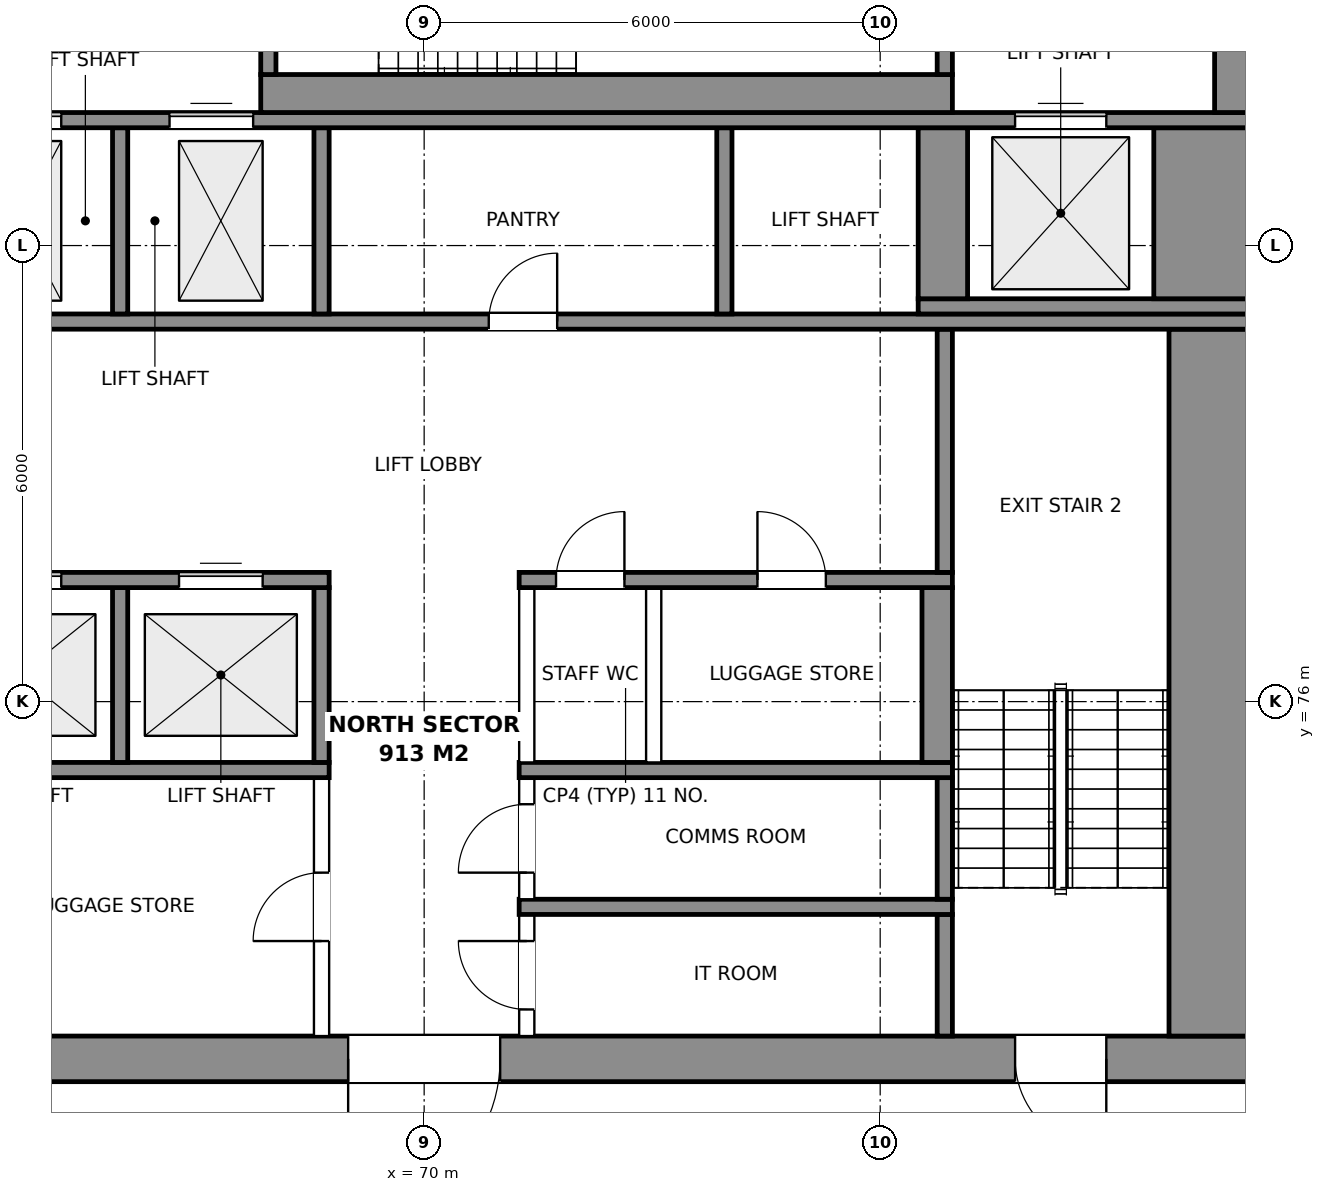
"""IFC4 building model, lengths in metres.
Left out: names, types, materials, properties, quantities, classifications, styles, units other than length and angle.
Written with IfcOpenShell. Run it as: python <this file> out.ifc"""

import sys

from ifc_helpers import new_model, si_unit, direction, frame, frame_2d, origin, place, context, subcontext, project, spatial, rectangle, extrude, element, fill, save


model = new_model("IFC4")
c1 = context("Model", 3, precision=1e-05, world=origin(), true_north=direction((0.0, 1.0)))
c2 = subcontext(c1, "Body", "Model", "MODEL_VIEW")
j1 = project(units=[si_unit("LENGTHUNIT", "METRE"), si_unit("PLANEANGLEUNIT", "RADIAN")], contexts=[c1])
p1 = place(None, origin())
s1 = spatial("IfcSite", under=j1, at=p1, CompositionType="ELEMENT")
p2 = place(p1, origin())
s2 = spatial("IfcBuilding", under=s1, at=p2, CompositionType="ELEMENT")
p3 = place(p2, frame((0.0, 0.0, 313.9)))
s3 = spatial("IfcBuildingStorey", under=s2, at=p3, CompositionType="ELEMENT", Elevation=313.9)
p4 = place(p3, frame((59.0, 71.3, 0.0), z_axis=(0.0, 0.0, 1.0), x_axis=(1.0, 0.0, 0.0)))
e1 = element("IfcWall", 1, at=p4, inside=s3, PredefinedType="SHEAR", context=c2, shape_type="SweptSolid", body=[
    extrude(rectangle(XDim=22.0, YDim=0.6, at=frame_2d((11.0, 0.0))), origin(), (0.0, 0.0, 1.0), 3.9),
])
p5 = place(p4, frame((2.025, 0.0, 0.0)))
e2 = element("IfcOpeningElement", 2, at=p5, cuts=e1, PredefinedType="OPENING", context=c2, shape_type="SweptSolid", body=[
    extrude(rectangle(XDim=1.2, YDim=2.1, at=frame_2d((0.6, 1.05))), frame((0.0, 0.31, 0.0), z_axis=(0.0, -1.0, 0.0), x_axis=(1.0, 0.0, 0.0)), (0.0, 0.0, 1.0), 0.62),
])
p6 = place(p4, frame((18.775, 0.0, 0.0)))
e3 = element("IfcOpeningElement", 3, at=p6, cuts=e1, PredefinedType="OPENING", context=c2, shape_type="SweptSolid", body=[
    extrude(rectangle(XDim=1.2, YDim=2.1, at=frame_2d((0.6, 1.05))), frame((0.0, 0.31, 0.0), z_axis=(0.0, -1.0, 0.0), x_axis=(1.0, 0.0, 0.0)), (0.0, 0.0, 1.0), 0.62),
])
p7 = place(p4, frame((10.0, 0.0, 0.0)))
e4 = element("IfcOpeningElement", 4, at=p7, cuts=e1, PredefinedType="OPENING", context=c2, shape_type="SweptSolid", body=[
    extrude(rectangle(XDim=2.0, YDim=2.1, at=frame_2d((1.0, 1.05))), frame((0.0, 0.31, 0.0), z_axis=(0.0, -1.0, 0.0), x_axis=(1.0, 0.0, 0.0)), (0.0, 0.0, 1.0), 0.62),
])
p8 = place(p3, frame((68.65, 71.6, 0.0), z_axis=(0.0, 0.0, 1.0), x_axis=(0.0, 1.0, 0.0)))
e5 = element("IfcWall", 5, at=p8, inside=s3, PredefinedType="PARTITIONING", context=c2, shape_type="SweptSolid", body=[
    extrude(rectangle(XDim=3.4, YDim=0.2, at=frame_2d((1.7, 0.0))), origin(), (0.0, 0.0, 1.0), 3.6),
])
p9 = place(p8, frame((1.25, 0.0, 0.0)))
e6 = element("IfcOpeningElement", 6, at=p9, cuts=e5, PredefinedType="OPENING", context=c2, shape_type="SweptSolid", body=[
    extrude(rectangle(XDim=0.9, YDim=2.1, at=frame_2d((0.45, 1.05))), frame((0.0, 0.11, 0.0), z_axis=(0.0, -1.0, 0.0), x_axis=(1.0, 0.0, 0.0)), (0.0, 0.0, 1.0), 0.22),
])
p10 = place(p3, frame((71.35, 71.6, 0.0), z_axis=(0.0, 0.0, 1.0), x_axis=(0.0, 1.0, 0.0)))
e7 = element("IfcWall", 7, at=p10, inside=s3, PredefinedType="PARTITIONING", context=c2, shape_type="SweptSolid", body=[
    extrude(rectangle(XDim=1.6, YDim=0.2, at=frame_2d((0.8, 0.0))), origin(), (0.0, 0.0, 1.0), 3.6),
])
p11 = place(p10, frame((0.35, 0.0, 0.0)))
e8 = element("IfcOpeningElement", 8, at=p11, cuts=e7, PredefinedType="OPENING", context=c2, shape_type="SweptSolid", body=[
    extrude(rectangle(XDim=0.9, YDim=2.1, at=frame_2d((0.45, 1.05))), frame((0.0, 0.11, 0.0), z_axis=(0.0, -1.0, 0.0), x_axis=(1.0, 0.0, 0.0)), (0.0, 0.0, 1.0), 0.22),
])
p12 = place(p3, frame((76.85, 71.6, 0.0), z_axis=(0.0, 0.0, 1.0), x_axis=(0.0, 1.0, 0.0)))
e9 = element("IfcWall", 9, at=p12, inside=s3, PredefinedType="SHEAR", context=c2, shape_type="SweptSolid", body=[
    extrude(rectangle(XDim=1.6, YDim=0.2, at=frame_2d((0.8, 0.0))), origin(), (0.0, 0.0, 1.0), 3.9),
])
p13 = place(p3, frame((80.4, 71.6, 0.0), z_axis=(0.0, 0.0, 1.0), x_axis=(0.0, 1.0, 0.0)))
e10 = element("IfcWall", 10, at=p13, inside=s3, PredefinedType="SHEAR", context=c2, shape_type="SweptSolid", body=[
    extrude(rectangle(XDim=9.3, YDim=1.2, at=frame_2d((4.65, 0.0))), origin(), (0.0, 0.0, 1.0), 3.9),
])
p14 = place(p3, frame((71.25, 73.3, 0.0), z_axis=(0.0, 0.0, 1.0), x_axis=(1.0, 0.0, 0.0)))
e11 = element("IfcWall", 11, at=p14, inside=s3, PredefinedType="SHEAR", context=c2, shape_type="SweptSolid", body=[
    extrude(rectangle(XDim=5.7, YDim=0.2, at=frame_2d((2.85, 0.0))), origin(), (0.0, 0.0, 1.0), 3.9),
])
p15 = place(p3, frame((71.35, 73.4, 0.0), z_axis=(0.0, 0.0, 1.0), x_axis=(0.0, 1.0, 0.0)))
e12 = element("IfcWall", 12, at=p15, inside=s3, PredefinedType="PARTITIONING", context=c2, shape_type="SweptSolid", body=[
    extrude(rectangle(XDim=1.6, YDim=0.2, at=frame_2d((0.8, 0.0))), origin(), (0.0, 0.0, 1.0), 3.6),
])
p16 = place(p15, frame((0.35, 0.0, 0.0)))
e13 = element("IfcOpeningElement", 13, at=p16, cuts=e12, PredefinedType="OPENING", context=c2, shape_type="SweptSolid", body=[
    extrude(rectangle(XDim=0.9, YDim=2.1, at=frame_2d((0.45, 1.05))), frame((0.0, 0.11, 0.0), z_axis=(0.0, -1.0, 0.0), x_axis=(1.0, 0.0, 0.0)), (0.0, 0.0, 1.0), 0.22),
])
p17 = place(p3, frame((76.85, 73.4, 0.0), z_axis=(0.0, 0.0, 1.0), x_axis=(0.0, 1.0, 0.0)))
e14 = element("IfcWall", 14, at=p17, inside=s3, PredefinedType="SHEAR", context=c2, shape_type="SweptSolid", body=[
    extrude(rectangle(XDim=1.6, YDim=0.2, at=frame_2d((0.8, 0.0))), origin(), (0.0, 0.0, 1.0), 3.9),
])
for number, where, z_axis, x_axis in (
    (15, (63.05, 75.1, 0.0), (0.0, 0.0, 1.0), (1.0, 0.0, 0.0)),
    (16, (71.25, 75.1, 0.0), (0.0, 0.0, 1.0), (1.0, 0.0, 0.0)),
):
    element("IfcWall", number, at=place(p3, frame(where, z_axis=z_axis, x_axis=x_axis)), inside=s3, PredefinedType="SHEAR", context=c2, shape_type="SweptSolid", body=[
        extrude(rectangle(XDim=5.7, YDim=0.2, at=frame_2d((2.85, 0.0))), origin(), (0.0, 0.0, 1.0), 3.9),
    ])
for number, where, z_axis, x_axis in (
    (17, (66.0, 75.2, 0.0), (0.0, 0.0, 1.0), (0.0, 1.0, 0.0)),
    (18, (68.65, 75.2, 0.0), (0.0, 0.0, 1.0), (0.0, 1.0, 0.0)),
):
    element("IfcWall", number, at=place(p3, frame(where, z_axis=z_axis, x_axis=x_axis)), inside=s3, PredefinedType="SHEAR", context=c2, shape_type="SweptSolid", body=[
        extrude(rectangle(XDim=2.3, YDim=0.2, at=frame_2d((1.15, 0.0))), origin(), (0.0, 0.0, 1.0), 3.9),
    ])
for number, where, z_axis, x_axis in (
    (19, (71.35, 75.2, 0.0), (0.0, 0.0, 1.0), (0.0, 1.0, 0.0)),
    (20, (73.02, 75.2, 0.0), (0.0, 0.0, 1.0), (0.0, 1.0, 0.0)),
):
    element("IfcWall", number, at=place(p3, frame(where, z_axis=z_axis, x_axis=x_axis)), inside=s3, PredefinedType="PARTITIONING", context=c2, shape_type="SweptSolid", body=[
        extrude(rectangle(XDim=2.3, YDim=0.2, at=frame_2d((1.15, 0.0))), origin(), (0.0, 0.0, 1.0), 3.6),
    ])
p18 = place(p3, frame((76.75, 75.2, 0.0), z_axis=(0.0, 0.0, 1.0), x_axis=(0.0, 1.0, 0.0)))
e21 = element("IfcWall", 21, at=p18, inside=s3, PredefinedType="SHEAR", context=c2, shape_type="SweptSolid", body=[
    extrude(rectangle(XDim=2.3, YDim=0.4, at=frame_2d((1.15, 0.0))), origin(), (0.0, 0.0, 1.0), 3.9),
])
p19 = place(p3, frame((63.05, 77.6, 0.0), z_axis=(0.0, 0.0, 1.0), x_axis=(1.0, 0.0, 0.0)))
e22 = element("IfcWall", 22, at=p19, inside=s3, PredefinedType="SHEAR", context=c2, shape_type="SweptSolid", body=[
    extrude(rectangle(XDim=5.7, YDim=0.2, at=frame_2d((2.85, 0.0))), origin(), (0.0, 0.0, 1.0), 3.9),
])
p20 = place(p19, frame((1.075, 0.0, 0.0)))
e23 = element("IfcOpeningElement", 23, at=p20, cuts=e22, PredefinedType="OPENING", context=c2, shape_type="SweptSolid", body=[
    extrude(rectangle(XDim=1.1, YDim=2.1, at=frame_2d((0.55, 1.05))), frame((0.0, 0.11, 0.0), z_axis=(0.0, -1.0, 0.0), x_axis=(1.0, 0.0, 0.0)), (0.0, 0.0, 1.0), 0.22),
])
p21 = place(p19, frame((3.725, 0.0, 0.0)))
e24 = element("IfcOpeningElement", 24, at=p21, cuts=e22, PredefinedType="OPENING", context=c2, shape_type="SweptSolid", body=[
    extrude(rectangle(XDim=1.1, YDim=2.1, at=frame_2d((0.55, 1.05))), frame((0.0, 0.11, 0.0), z_axis=(0.0, -1.0, 0.0), x_axis=(1.0, 0.0, 0.0)), (0.0, 0.0, 1.0), 0.22),
])
p22 = place(p3, frame((71.25, 77.6, 0.0), z_axis=(0.0, 0.0, 1.0), x_axis=(1.0, 0.0, 0.0)))
e25 = element("IfcWall", 25, at=p22, inside=s3, PredefinedType="SHEAR", context=c2, shape_type="SweptSolid", body=[
    extrude(rectangle(XDim=5.7, YDim=0.2, at=frame_2d((2.85, 0.0))), origin(), (0.0, 0.0, 1.0), 3.9),
])
p23 = place(p22, frame((0.485, 0.0, 0.0)))
e26 = element("IfcOpeningElement", 26, at=p23, cuts=e25, PredefinedType="OPENING", context=c2, shape_type="SweptSolid", body=[
    extrude(rectangle(XDim=0.9, YDim=2.1, at=frame_2d((0.45, 1.05))), frame((0.0, 0.11, 0.0), z_axis=(0.0, -1.0, 0.0), x_axis=(1.0, 0.0, 0.0)), (0.0, 0.0, 1.0), 0.22),
])
p24 = place(p22, frame((3.135, 0.0, 0.0)))
e27 = element("IfcOpeningElement", 27, at=p24, cuts=e25, PredefinedType="OPENING", context=c2, shape_type="SweptSolid", body=[
    extrude(rectangle(XDim=0.9, YDim=2.1, at=frame_2d((0.45, 1.05))), frame((0.0, 0.11, 0.0), z_axis=(0.0, -1.0, 0.0), x_axis=(1.0, 0.0, 0.0)), (0.0, 0.0, 1.0), 0.22),
])
p25 = place(p3, frame((76.85, 77.7, 0.0), z_axis=(0.0, 0.0, 1.0), x_axis=(0.0, 1.0, 0.0)))
e28 = element("IfcWall", 28, at=p25, inside=s3, PredefinedType="SHEAR", context=c2, shape_type="SweptSolid", body=[
    extrude(rectangle(XDim=3.2, YDim=0.2, at=frame_2d((1.6, 0.0))), origin(), (0.0, 0.0, 1.0), 3.9),
])
p26 = place(p3, frame((59.0, 81.0, 0.0), z_axis=(0.0, 0.0, 1.0), x_axis=(1.0, 0.0, 0.0)))
e29 = element("IfcWall", 29, at=p26, inside=s3, PredefinedType="SHEAR", context=c2, shape_type="SweptSolid", body=[
    extrude(rectangle(XDim=22.0, YDim=0.2, at=frame_2d((11.0, 0.0))), origin(), (0.0, 0.0, 1.0), 3.9),
])
p27 = place(p26, frame((11.85, 0.0, 0.0)))
e30 = element("IfcOpeningElement", 30, at=p27, cuts=e29, PredefinedType="OPENING", context=c2, shape_type="SweptSolid", body=[
    extrude(rectangle(XDim=0.9, YDim=2.1, at=frame_2d((0.45, 1.05))), frame((0.0, 0.11, 0.0), z_axis=(0.0, -1.0, 0.0), x_axis=(1.0, 0.0, 0.0)), (0.0, 0.0, 1.0), 0.22),
])
for number, where, z_axis, x_axis in (
    (31, (66.0, 81.1, 0.0), (0.0, 0.0, 1.0), (0.0, 1.0, 0.0)),
    (32, (68.65, 81.1, 0.0), (0.0, 0.0, 1.0), (0.0, 1.0, 0.0)),
    (33, (73.95, 81.1, 0.0), (0.0, 0.0, 1.0), (0.0, 1.0, 0.0)),
):
    element("IfcWall", number, at=place(p3, frame(where, z_axis=z_axis, x_axis=x_axis)), inside=s3, PredefinedType="SHEAR", context=c2, shape_type="SweptSolid", body=[
        extrude(rectangle(XDim=2.45, YDim=0.2, at=frame_2d((1.225, 0.0))), origin(), (0.0, 0.0, 1.0), 3.9),
    ])
p28 = place(p3, frame((76.5, 81.2, 0.0), z_axis=(0.0, 0.0, 1.0), x_axis=(1.0, 0.0, 0.0)))
e34 = element("IfcWall", 34, at=p28, inside=s3, PredefinedType="SHEAR", context=c2, shape_type="SweptSolid", body=[
    extrude(rectangle(XDim=4.5, YDim=0.2, at=frame_2d((2.25, 0.0))), origin(), (0.0, 0.0, 1.0), 3.9),
])
p29 = place(p3, frame((76.825, 81.3, 0.0), z_axis=(0.0, 0.0, 1.0), x_axis=(0.0, 1.0, 0.0)))
e35 = element("IfcWall", 35, at=p29, inside=s3, PredefinedType="SHEAR", context=c2, shape_type="SweptSolid", body=[
    extrude(rectangle(XDim=2.25, YDim=0.65, at=frame_2d((1.125, 0.0))), origin(), (0.0, 0.0, 1.0), 3.9),
])
p30 = place(p3, frame((80.3, 81.3, 0.0), z_axis=(0.0, 0.0, 1.0), x_axis=(0.0, 1.0, 0.0)))
e36 = element("IfcWall", 36, at=p30, inside=s3, PredefinedType="SHEAR", context=c2, shape_type="SweptSolid", body=[
    extrude(rectangle(XDim=2.25, YDim=1.4, at=frame_2d((1.125, 0.0))), origin(), (0.0, 0.0, 1.0), 3.9),
])
p31 = place(p3, frame((59.0, 83.65, 0.0), z_axis=(0.0, 0.0, 1.0), x_axis=(1.0, 0.0, 0.0)))
e37 = element("IfcWall", 37, at=p31, inside=s3, PredefinedType="SHEAR", context=c2, shape_type="SweptSolid", body=[
    extrude(rectangle(XDim=22.0, YDim=0.2, at=frame_2d((11.0, 0.0))), origin(), (0.0, 0.0, 1.0), 3.9),
])
p32 = place(p31, frame((5.125, 0.0, 0.0)))
e38 = element("IfcOpeningElement", 38, at=p32, cuts=e37, PredefinedType="OPENING", context=c2, shape_type="SweptSolid", body=[
    extrude(rectangle(XDim=1.1, YDim=2.1, at=frame_2d((0.55, 1.05))), frame((0.0, 0.11, 0.0), z_axis=(0.0, -1.0, 0.0), x_axis=(1.0, 0.0, 0.0)), (0.0, 0.0, 1.0), 0.22),
])
p33 = place(p31, frame((7.65, 0.0, 0.0)))
e39 = element("IfcOpeningElement", 39, at=p33, cuts=e37, PredefinedType="OPENING", context=c2, shape_type="SweptSolid", body=[
    extrude(rectangle(XDim=1.1, YDim=2.1, at=frame_2d((0.55, 1.05))), frame((0.0, 0.11, 0.0), z_axis=(0.0, -1.0, 0.0), x_axis=(1.0, 0.0, 0.0)), (0.0, 0.0, 1.0), 0.22),
])
p34 = place(p31, frame((18.775, 0.0, 0.0)))
e40 = element("IfcOpeningElement", 40, at=p34, cuts=e37, PredefinedType="OPENING", context=c2, shape_type="SweptSolid", body=[
    extrude(rectangle(XDim=1.2, YDim=2.1, at=frame_2d((0.6, 1.05))), frame((0.0, 0.11, 0.0), z_axis=(0.0, -1.0, 0.0), x_axis=(1.0, 0.0, 0.0)), (0.0, 0.0, 1.0), 0.22),
])
p35 = place(p31, frame((2.075, 0.0, 0.0)))
e41 = element("IfcOpeningElement", 41, at=p35, cuts=e37, PredefinedType="OPENING", context=c2, shape_type="SweptSolid", body=[
    extrude(rectangle(XDim=1.1, YDim=2.1, at=frame_2d((0.55, 1.05))), frame((0.0, 0.11, 0.0), z_axis=(0.0, -1.0, 0.0), x_axis=(1.0, 0.0, 0.0)), (0.0, 0.0, 1.0), 0.22),
])
p36 = place(p3, frame((67.85, 84.0, 0.0), z_axis=(0.0, 0.0, 1.0), x_axis=(1.0, 0.0, 0.0)))
e42 = element("IfcWall", 42, at=p36, inside=s3, PredefinedType="SHEAR", context=c2, shape_type="SweptSolid", body=[
    extrude(rectangle(XDim=9.1, YDim=0.5, at=frame_2d((4.55, 0.0))), origin(), (0.0, 0.0, 1.0), 3.9),
])
p37 = place(p3, frame((80.7, 83.75, 0.0), z_axis=(0.0, 0.0, 1.0), x_axis=(0.0, 1.0, 0.0)))
e43 = element("IfcWall", 43, at=p37, inside=s3, PredefinedType="SHEAR", context=c2, shape_type="SweptSolid", body=[
    extrude(rectangle(XDim=3.65, YDim=0.6, at=frame_2d((1.825, 0.0))), origin(), (0.0, 0.0, 1.0), 3.9),
])
p38 = place(p37, frame((1.225, 0.0, 0.0)))
e44 = element("IfcOpeningElement", 44, at=p38, cuts=e43, PredefinedType="OPENING", context=c2, shape_type="SweptSolid", body=[
    extrude(rectangle(XDim=1.2, YDim=2.1, at=frame_2d((0.6, 1.05))), frame((0.0, 0.31, 0.0), z_axis=(0.0, -1.0, 0.0), x_axis=(1.0, 0.0, 0.0)), (0.0, 0.0, 1.0), 0.62),
])
p39 = place(p3, frame((67.95, 84.25, 0.0), z_axis=(0.0, 0.0, 1.0), x_axis=(0.0, 1.0, 0.0)))
e45 = element("IfcWall", 45, at=p39, inside=s3, PredefinedType="SHEAR", context=c2, shape_type="SweptSolid", body=[
    extrude(rectangle(XDim=2.85, YDim=0.2, at=frame_2d((1.425, 0.0))), origin(), (0.0, 0.0, 1.0), 3.9),
])
p40 = place(p39, frame((0.825, 0.0, 0.0)))
e46 = element("IfcOpeningElement", 46, at=p40, cuts=e45, PredefinedType="OPENING", context=c2, shape_type="SweptSolid", body=[
    extrude(rectangle(XDim=1.2, YDim=2.1, at=frame_2d((0.6, 1.05))), frame((0.0, 0.11, 0.0), z_axis=(0.0, -1.0, 0.0), x_axis=(1.0, 0.0, 0.0)), (0.0, 0.0, 1.0), 0.22),
])
p41 = place(p3, frame((76.85, 84.25, 0.0), z_axis=(0.0, 0.0, 1.0), x_axis=(0.0, 1.0, 0.0)))
e47 = element("IfcWall", 47, at=p41, inside=s3, PredefinedType="SHEAR", context=c2, shape_type="SweptSolid", body=[
    extrude(rectangle(XDim=2.85, YDim=0.2, at=frame_2d((1.425, 0.0))), origin(), (0.0, 0.0, 1.0), 3.9),
])
p42 = place(p6, frame((1.2, 0.0, 0.0), z_axis=(0.0, 0.0, 1.0), x_axis=(-1.0, 0.0, 0.0)))
e48 = element("IfcDoor", 48, at=p42, inside=s3, OperationType="SINGLE_SWING_LEFT", PredefinedType="DOOR", context=c2, shape_type="SweptSolid", body=[
    extrude(rectangle(XDim=1.2, YDim=2.1, at=frame_2d((0.6, 1.05))), frame((0.0, 0.025, 0.0), z_axis=(0.0, -1.0, 0.0), x_axis=(1.0, 0.0, 0.0)), (0.0, 0.0, 1.0), 0.05),
])
fill(e3, e48)
p43 = place(p7, frame((2.0, 0.0, 0.0), z_axis=(0.0, 0.0, 1.0), x_axis=(-1.0, 0.0, 0.0)))
e49 = element("IfcDoor", 49, at=p43, inside=s3, OperationType="DOUBLE_DOOR_SINGLE_SWING", PredefinedType="DOOR", context=c2, shape_type="SweptSolid", body=[
    extrude(rectangle(XDim=2.0, YDim=2.1, at=frame_2d((1.0, 1.05))), frame((0.0, 0.025, 0.0), z_axis=(0.0, -1.0, 0.0), x_axis=(1.0, 0.0, 0.0)), (0.0, 0.0, 1.0), 0.05),
])
fill(e4, e49)
p44 = place(p9, origin())
e50 = element("IfcDoor", 50, at=p44, inside=s3, OperationType="SINGLE_SWING_LEFT", PredefinedType="DOOR", context=c2, shape_type="SweptSolid", body=[
    extrude(rectangle(XDim=0.9, YDim=2.1, at=frame_2d((0.45, 1.05))), frame((0.0, 0.025, 0.0), z_axis=(0.0, -1.0, 0.0), x_axis=(1.0, 0.0, 0.0)), (0.0, 0.0, 1.0), 0.05),
])
fill(e6, e50)
p45 = place(p11, origin())
e51 = element("IfcDoor", 51, at=p45, inside=s3, OperationType="SINGLE_SWING_RIGHT", PredefinedType="DOOR", context=c2, shape_type="SweptSolid", body=[
    extrude(rectangle(XDim=0.9, YDim=2.1, at=frame_2d((0.45, 1.05))), frame((0.0, 0.025, 0.0), z_axis=(0.0, -1.0, 0.0), x_axis=(1.0, 0.0, 0.0)), (0.0, 0.0, 1.0), 0.05),
])
fill(e8, e51)
p46 = place(p16, origin())
e52 = element("IfcDoor", 52, at=p46, inside=s3, OperationType="SINGLE_SWING_LEFT", PredefinedType="DOOR", context=c2, shape_type="SweptSolid", body=[
    extrude(rectangle(XDim=0.9, YDim=2.1, at=frame_2d((0.45, 1.05))), frame((0.0, 0.025, 0.0), z_axis=(0.0, -1.0, 0.0), x_axis=(1.0, 0.0, 0.0)), (0.0, 0.0, 1.0), 0.05),
])
fill(e13, e52)
p47 = place(p20, origin())
e53 = element("IfcDoor", 53, at=p47, inside=s3, OperationType="DOUBLE_DOOR_SLIDING", PredefinedType="DOOR", context=c2, shape_type="SweptSolid", body=[
    extrude(rectangle(XDim=1.1, YDim=2.1, at=frame_2d((0.55, 1.05))), frame((0.0, 0.025, 0.0), z_axis=(0.0, -1.0, 0.0), x_axis=(1.0, 0.0, 0.0)), (0.0, 0.0, 1.0), 0.05),
])
fill(e23, e53)
p48 = place(p21, origin())
e54 = element("IfcDoor", 54, at=p48, inside=s3, OperationType="DOUBLE_DOOR_SLIDING", PredefinedType="DOOR", context=c2, shape_type="SweptSolid", body=[
    extrude(rectangle(XDim=1.1, YDim=2.1, at=frame_2d((0.55, 1.05))), frame((0.0, 0.025, 0.0), z_axis=(0.0, -1.0, 0.0), x_axis=(1.0, 0.0, 0.0)), (0.0, 0.0, 1.0), 0.05),
])
fill(e24, e54)
p49 = place(p32, origin())
e55 = element("IfcDoor", 55, at=p49, inside=s3, OperationType="DOUBLE_DOOR_SLIDING", PredefinedType="DOOR", context=c2, shape_type="SweptSolid", body=[
    extrude(rectangle(XDim=1.1, YDim=2.1, at=frame_2d((0.55, 1.05))), frame((0.0, 0.025, 0.0), z_axis=(0.0, -1.0, 0.0), x_axis=(1.0, 0.0, 0.0)), (0.0, 0.0, 1.0), 0.05),
])
fill(e38, e55)
p50 = place(p33, origin())
e56 = element("IfcDoor", 56, at=p50, inside=s3, OperationType="DOUBLE_DOOR_SLIDING", PredefinedType="DOOR", context=c2, shape_type="SweptSolid", body=[
    extrude(rectangle(XDim=1.1, YDim=2.1, at=frame_2d((0.55, 1.05))), frame((0.0, 0.025, 0.0), z_axis=(0.0, -1.0, 0.0), x_axis=(1.0, 0.0, 0.0)), (0.0, 0.0, 1.0), 0.05),
])
fill(e39, e56)
p51 = place(p34, origin())
e57 = element("IfcDoor", 57, at=p51, inside=s3, OperationType="DOUBLE_DOOR_SLIDING", PredefinedType="DOOR", context=c2, shape_type="SweptSolid", body=[
    extrude(rectangle(XDim=1.2, YDim=2.1, at=frame_2d((0.6, 1.05))), frame((0.0, 0.025, 0.0), z_axis=(0.0, -1.0, 0.0), x_axis=(1.0, 0.0, 0.0)), (0.0, 0.0, 1.0), 0.05),
])
fill(e40, e57)
p52 = place(p23, origin())
e58 = element("IfcDoor", 58, at=p52, inside=s3, OperationType="SINGLE_SWING_RIGHT", PredefinedType="DOOR", context=c2, shape_type="SweptSolid", body=[
    extrude(rectangle(XDim=0.9, YDim=2.1, at=frame_2d((0.45, 1.05))), frame((0.0, 0.025, 0.0), z_axis=(0.0, -1.0, 0.0), x_axis=(1.0, 0.0, 0.0)), (0.0, 0.0, 1.0), 0.05),
])
fill(e26, e58)
p53 = place(p24, origin())
e59 = element("IfcDoor", 59, at=p53, inside=s3, OperationType="SINGLE_SWING_LEFT", PredefinedType="DOOR", context=c2, shape_type="SweptSolid", body=[
    extrude(rectangle(XDim=0.9, YDim=2.1, at=frame_2d((0.45, 1.05))), frame((0.0, 0.025, 0.0), z_axis=(0.0, -1.0, 0.0), x_axis=(1.0, 0.0, 0.0)), (0.0, 0.0, 1.0), 0.05),
])
fill(e27, e59)
p54 = place(p27, origin())
e60 = element("IfcDoor", 60, at=p54, inside=s3, OperationType="SINGLE_SWING_RIGHT", PredefinedType="DOOR", context=c2, shape_type="SweptSolid", body=[
    extrude(rectangle(XDim=0.9, YDim=2.1, at=frame_2d((0.45, 1.05))), frame((0.0, 0.025, 0.0), z_axis=(0.0, -1.0, 0.0), x_axis=(1.0, 0.0, 0.0)), (0.0, 0.0, 1.0), 0.05),
])
fill(e30, e60)
save(model, sys.argv[1])
